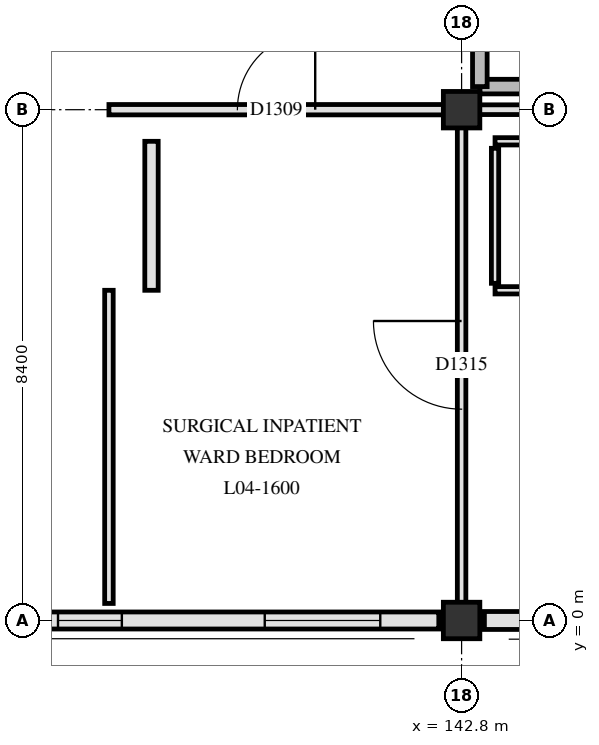
"""IFC4 building model, lengths in metres.
Left out: names, types, materials, properties, quantities, classifications, styles, units other than length and angle.
Written with IfcOpenShell. Run it as: python <this file> out.ifc"""

import sys

from ifc_helpers import new_model, si_unit, direction, frame, frame_2d, origin, origin_2d, place, context, subcontext, project, spatial, rectangle, extrude, element, fill, save


model = new_model("IFC4")
c1 = context("Model", 3, precision=1e-05, world=origin(), true_north=direction((0.0, 1.0)))
c2 = subcontext(c1, "Body", "Model", "MODEL_VIEW")
j1 = project(units=[si_unit("LENGTHUNIT", "METRE"), si_unit("PLANEANGLEUNIT", "RADIAN")], contexts=[c1])
p1 = place(None, origin())
s1 = spatial("IfcSite", under=j1, at=p1, CompositionType="ELEMENT")
p2 = place(p1, origin())
s2 = spatial("IfcBuilding", under=s1, at=p2, CompositionType="ELEMENT")
p3 = place(p2, frame((0.0, 0.0, 18.6)))
s3 = spatial("IfcBuildingStorey", under=s2, at=p3, CompositionType="ELEMENT", Elevation=18.6)
for number, where, z_axis, x_axis in (
    (1, (142.8, 0.0, 0.0), (0.0, 0.0, 1.0), (1.0, 0.0, 0.0)),
    (2, (142.8, 8.4, 0.0), (0.0, 0.0, 1.0), (1.0, 0.0, 0.0)),
):
    element("IfcColumn", number, at=place(p3, frame(where, z_axis=z_axis, x_axis=x_axis)), inside=s3, PredefinedType="COLUMN", context=c2, shape_type="SweptSolid", body=[
        extrude(rectangle(XDim=0.6, YDim=0.6, at=origin_2d()), origin(), (0.0, 0.0, 1.0), 3.9),
    ])
p4 = place(p3, frame((150.875, 0.0, 0.0), z_axis=(0.0, 0.0, 1.0), x_axis=(-1.0, 0.0, 0.0)))
e3 = element("IfcWall", 3, at=p4, inside=s3, PredefinedType="SOLIDWALL", context=c2, shape_type="SweptSolid", body=[
    extrude(rectangle(XDim=7.7, YDim=0.295, at=frame_2d((3.85, 0.0))), origin(), (0.0, 0.0, 1.0), 3.31),
])
p5 = place(p4, frame((1.075, 0.0, 0.85)))
e4 = element("IfcOpeningElement", 4, at=p5, cuts=e3, PredefinedType="OPENING", context=c2, shape_type="SweptSolid", body=[
    extrude(rectangle(XDim=1.7, YDim=1.42, at=frame_2d((0.85, 0.71))), frame((0.0, 0.157, 0.0), z_axis=(0.0, -1.0, 0.0), x_axis=(1.0, 0.0, 0.0)), (0.0, 0.0, 1.0), 0.315),
])
p6 = place(p4, frame((4.875, 0.0, 0.85)))
e5 = element("IfcOpeningElement", 5, at=p6, cuts=e3, PredefinedType="OPENING", context=c2, shape_type="SweptSolid", body=[
    extrude(rectangle(XDim=1.8, YDim=1.42, at=frame_2d((0.9, 0.71))), frame((0.0, 0.157, 0.0), z_axis=(0.0, -1.0, 0.0), x_axis=(1.0, 0.0, 0.0)), (0.0, 0.0, 1.0), 0.315),
])
p7 = place(p3, frame((142.425, 0.0, 0.0), z_axis=(0.0, 0.0, 1.0), x_axis=(-1.0, 0.0, 0.0)))
e6 = element("IfcWall", 6, at=p7, inside=s3, PredefinedType="SOLIDWALL", context=c2, shape_type="SweptSolid", body=[
    extrude(rectangle(XDim=7.65, YDim=0.28, at=frame_2d((3.825, 0.0))), origin(), (0.0, 0.0, 1.0), 3.31),
])
p8 = place(p7, frame((0.962, 0.0, 0.85)))
e7 = element("IfcOpeningElement", 7, at=p8, cuts=e6, PredefinedType="OPENING", context=c2, shape_type="SweptSolid", body=[
    extrude(rectangle(XDim=1.9, YDim=1.42, at=frame_2d((0.95, 0.71))), frame((0.0, 0.15, 0.0), z_axis=(0.0, -1.0, 0.0), x_axis=(1.0, 0.0, 0.0)), (0.0, 0.0, 1.0), 0.3),
])
p9 = place(p7, frame((5.212, 0.0, 0.85)))
e8 = element("IfcOpeningElement", 8, at=p9, cuts=e6, PredefinedType="OPENING", context=c2, shape_type="SweptSolid", body=[
    extrude(rectangle(XDim=1.05, YDim=1.54, at=frame_2d((0.525, 0.77))), frame((0.0, 0.15, 0.0), z_axis=(0.0, -1.0, 0.0), x_axis=(1.0, 0.0, 0.0)), (0.0, 0.0, 1.0), 0.3),
])
p10 = place(p3, frame((143.1, 8.78, 0.0), z_axis=(0.0, 0.0, 1.0), x_axis=(1.0, 0.0, 0.0)))
e9 = element("IfcWall", 9, at=p10, inside=s3, PredefinedType="SHEAR", context=c2, shape_type="SweptSolid", body=[
    extrude(rectangle(XDim=7.82, YDim=0.24, at=frame_2d((3.91, 0.0))), origin(), (0.0, 0.0, 1.0), 3.62),
])
p11 = place(p3, frame((143.1, 8.78, 0.0), z_axis=(0.0, 0.0, 1.0), x_axis=(0.0, 1.0, 0.0)))
e10 = element("IfcWall", 10, at=p11, inside=s3, PredefinedType="SHEAR", context=c2, shape_type="SweptSolid", body=[
    extrude(rectangle(XDim=3.32, YDim=0.24, at=frame_2d((1.66, 0.0))), origin(), (0.0, 0.0, 1.0), 3.62),
])
p12 = place(p3, frame((143.35, 5.43, 0.0), z_axis=(0.0, 0.0, 1.0), x_axis=(1.0, 0.0, 0.0)))
e11 = element("IfcWall", 11, at=p12, inside=s3, PredefinedType="PARTITIONING", context=c2, shape_type="SweptSolid", body=[
    extrude(rectangle(XDim=2.75, YDim=0.12, at=frame_2d((1.375, 0.0))), origin(), (0.0, 0.0, 1.0), 3.61),
])
p13 = place(p12, frame((0.9, 0.0, 0.0)))
e12 = element("IfcOpeningElement", 12, at=p13, cuts=e11, PredefinedType="OPENING", context=c2, shape_type="SweptSolid", body=[
    extrude(rectangle(XDim=0.95, YDim=2.1, at=frame_2d((0.475, 1.05))), frame((0.0, 0.07, 0.0), z_axis=(0.0, -1.0, 0.0), x_axis=(1.0, 0.0, 0.0)), (0.0, 0.0, 1.0), 0.14),
])
p14 = place(p3, frame((143.35, 7.88, 0.0), z_axis=(0.0, 0.0, 1.0), x_axis=(1.0, 0.0, 0.0)))
e13 = element("IfcWall", 13, at=p14, inside=s3, PredefinedType="PARTITIONING", context=c2, shape_type="SweptSolid", body=[
    extrude(rectangle(XDim=2.75, YDim=0.12, at=frame_2d((1.375, 0.0))), origin(), (0.0, 0.0, 1.0), 3.61),
])
p15 = place(p3, frame((137.0, 8.4, 0.0), z_axis=(0.0, 0.0, 1.0), x_axis=(1.0, 0.0, 0.0)))
e14 = element("IfcWall", 14, at=p15, inside=s3, PredefinedType="PARTITIONING", context=c2, shape_type="SweptSolid", body=[
    extrude(rectangle(XDim=5.505, YDim=0.17, at=frame_2d((2.752, 0.0))), origin(), (0.0, 0.0, 1.0), 3.16),
])
p16 = place(p15, frame((2.113, 0.0, 0.0)))
e15 = element("IfcOpeningElement", 15, at=p16, cuts=e14, PredefinedType="OPENING", context=c2, shape_type="SweptSolid", body=[
    extrude(rectangle(XDim=1.28, YDim=2.18, at=frame_2d((0.64, 1.09))), frame((0.0, 0.095, 0.0), z_axis=(0.0, -1.0, 0.0), x_axis=(1.0, 0.0, 0.0)), (0.0, 0.0, 1.0), 0.19),
])
p17 = place(p3, frame((143.095, 8.4, 0.0), z_axis=(0.0, 0.0, 1.0), x_axis=(1.0, 0.0, 0.0)))
e16 = element("IfcWall", 16, at=p17, inside=s3, PredefinedType="PARTITIONING", context=c2, shape_type="SweptSolid", body=[
    extrude(rectangle(XDim=7.86, YDim=0.16, at=frame_2d((3.93, 0.0))), origin(), (0.0, 0.0, 1.0), 3.16),
])
p18 = place(p3, frame((137.0, 0.28, 0.0), z_axis=(0.0, 0.0, 1.0), x_axis=(0.0, 1.0, 0.0)))
e17 = element("IfcWall", 17, at=p18, inside=s3, PredefinedType="PARTITIONING", context=c2, shape_type="SweptSolid", body=[
    extrude(rectangle(XDim=5.15, YDim=0.14, at=frame_2d((2.575, 0.0))), origin(), (0.0, 0.0, 1.0), 3.31),
])
p19 = place(p3, frame((137.7, 5.43, 0.0), z_axis=(0.0, 0.0, 1.0), x_axis=(0.0, 1.0, 0.0)))
e18 = element("IfcWall", 18, at=p19, inside=s3, PredefinedType="PARTITIONING", context=c2, shape_type="SweptSolid", body=[
    extrude(rectangle(XDim=2.45, YDim=0.22, at=frame_2d((1.225, 0.0))), origin(), (0.0, 0.0, 1.0), 3.31),
])
p20 = place(p3, frame((142.8, 0.295, 0.0), z_axis=(0.0, 0.0, 1.0), x_axis=(0.0, 1.0, 0.0)))
e19 = element("IfcWall", 19, at=p20, inside=s3, PredefinedType="PARTITIONING", context=c2, shape_type="SweptSolid", body=[
    extrude(rectangle(XDim=7.81, YDim=0.14, at=frame_2d((3.905, 0.0))), origin(), (0.0, 0.0, 1.0), 3.26),
])
p21 = place(p20, frame((3.18, 0.0, 0.0)))
e20 = element("IfcOpeningElement", 20, at=p21, cuts=e19, PredefinedType="OPENING", context=c2, shape_type="SweptSolid", body=[
    extrude(rectangle(XDim=1.45, YDim=2.2, at=frame_2d((0.725, 1.1))), frame((0.0, 0.08, 0.0), z_axis=(0.0, -1.0, 0.0), x_axis=(1.0, 0.0, 0.0)), (0.0, 0.0, 1.0), 0.16),
])
p22 = place(p3, frame((143.35, 5.545, 0.0), z_axis=(0.0, 0.0, 1.0), x_axis=(0.0, 1.0, 0.0)))
e21 = element("IfcWall", 21, at=p22, inside=s3, PredefinedType="PARTITIONING", context=c2, shape_type="SweptSolid", body=[
    extrude(rectangle(XDim=2.22, YDim=0.12, at=frame_2d((1.11, 0.0))), origin(), (0.0, 0.0, 1.0), 3.31),
])
p23 = place(p8, origin())
e22 = element("IfcWindow", 22, at=p23, inside=s3, PartitioningType="SINGLE_PANEL", PredefinedType="WINDOW", context=c2, shape_type="SweptSolid", body=[
    extrude(rectangle(XDim=1.9, YDim=1.42, at=frame_2d((0.95, 0.71))), frame((0.0, 0.03, 0.0), z_axis=(0.0, -1.0, 0.0), x_axis=(1.0, 0.0, 0.0)), (0.0, 0.0, 1.0), 0.06),
])
fill(e7, e22)
p24 = place(p9, origin())
e23 = element("IfcWindow", 23, at=p24, inside=s3, PartitioningType="SINGLE_PANEL", PredefinedType="WINDOW", context=c2, shape_type="SweptSolid", body=[
    extrude(rectangle(XDim=1.05, YDim=1.54, at=frame_2d((0.525, 0.77))), frame((0.0, 0.03, 0.0), z_axis=(0.0, -1.0, 0.0), x_axis=(1.0, 0.0, 0.0)), (0.0, 0.0, 1.0), 0.06),
])
fill(e8, e23)
p25 = place(p16, origin())
e24 = element("IfcDoor", 24, at=p25, inside=s3, OperationType="SINGLE_SWING_RIGHT", PredefinedType="DOOR", context=c2, shape_type="SweptSolid", body=[
    extrude(rectangle(XDim=1.28, YDim=2.18, at=frame_2d((0.64, 1.09))), frame((0.0, 0.025, 0.0), z_axis=(0.0, -1.0, 0.0), x_axis=(1.0, 0.0, 0.0)), (0.0, 0.0, 1.0), 0.05),
])
fill(e15, e24)
p26 = place(p21, origin())
e25 = element("IfcDoor", 25, at=p26, inside=s3, OperationType="SINGLE_SWING_RIGHT", PredefinedType="DOOR", context=c2, shape_type="SweptSolid", body=[
    extrude(rectangle(XDim=1.45, YDim=2.2, at=frame_2d((0.725, 1.1))), frame((0.0, 0.025, 0.0), z_axis=(0.0, -1.0, 0.0), x_axis=(1.0, 0.0, 0.0)), (0.0, 0.0, 1.0), 0.05),
])
fill(e20, e25)
save(model, sys.argv[1])
